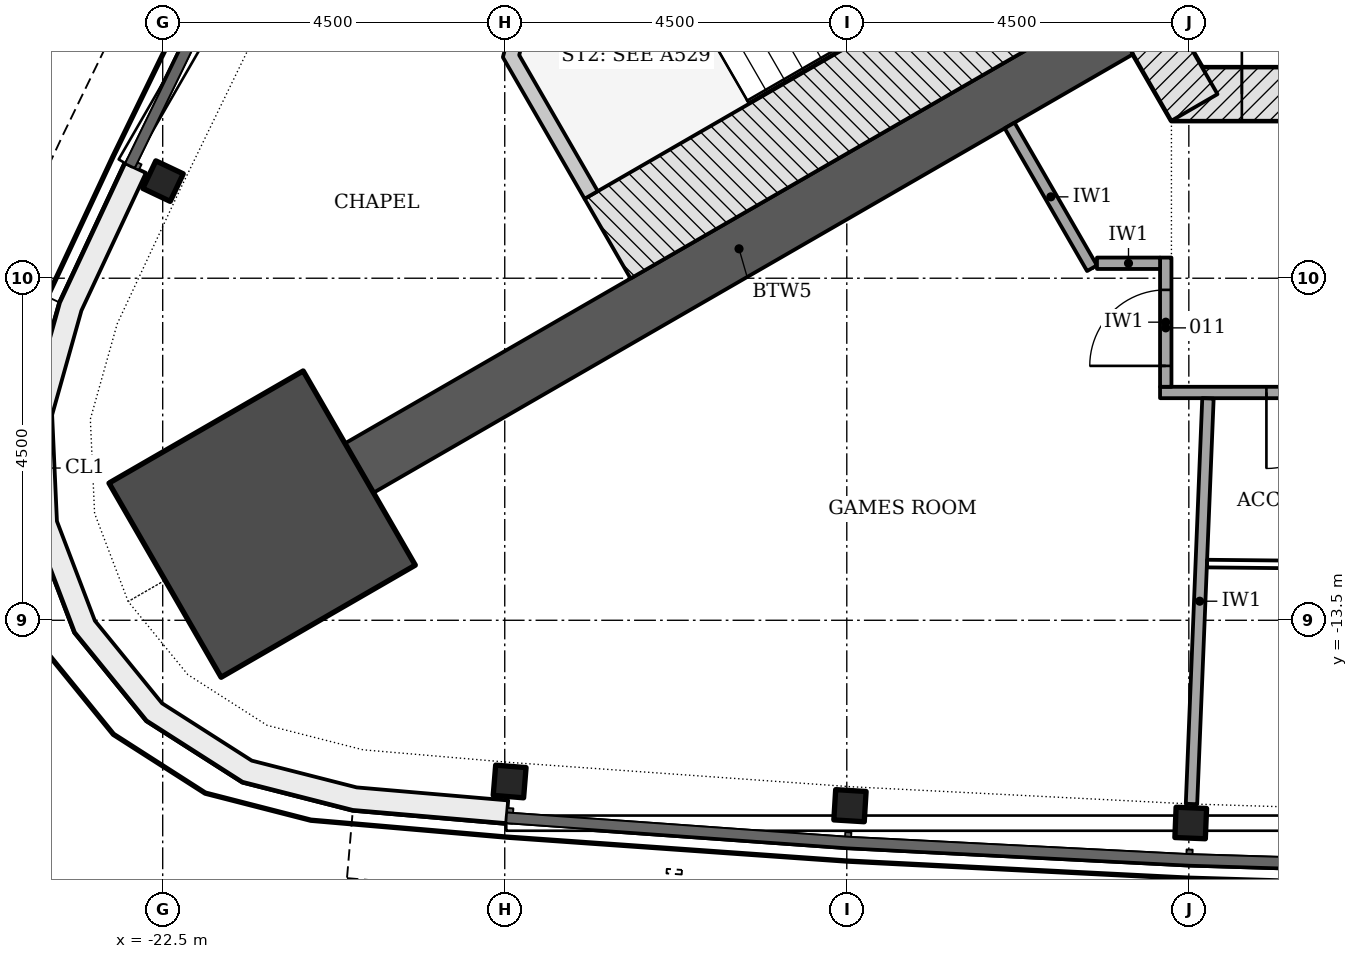
"""IFC4 building model, lengths in metres.
Left out: names, types, materials, properties, quantities, classifications, styles, units other than length and angle.
Written with IfcOpenShell. Run it as: python <this file> out.ifc"""

import sys

from ifc_helpers import new_model, si_unit, direction, frame, frame_2d, origin, origin_2d, place, context, subcontext, project, spatial, polyline, rectangle, i_section, outline, extrude, element, fill, save


model = new_model("IFC4")
c1 = context("Model", 3, precision=1e-05, world=origin(), true_north=direction((0.0, 1.0)))
c2 = subcontext(c1, "Body", "Model", "MODEL_VIEW")
j1 = project(units=[si_unit("LENGTHUNIT", "METRE"), si_unit("PLANEANGLEUNIT", "RADIAN")], contexts=[c1])
p1 = place(None, origin())
s1 = spatial("IfcSite", under=j1, at=p1, CompositionType="ELEMENT")
p2 = place(p1, origin())
s2 = spatial("IfcBuilding", under=s1, at=p2, CompositionType="ELEMENT")
p3 = place(p2, frame((0.0, 0.0, 116.7)))
s3 = spatial("IfcBuildingStorey", under=s2, at=p3, CompositionType="ELEMENT", Elevation=116.7)
p4 = place(p3, frame((-9.229, -6.578, -0.2), z_axis=(0.0, 0.0, 1.0), x_axis=(1.0, 0.0, 0.0)))
e1 = element("IfcWall", 1, at=p4, inside=s3, PredefinedType="SHEAR", context=c2, shape_type="SweptSolid", body=[
    extrude(rectangle(XDim=18.458, YDim=0.7, at=frame_2d((9.229, 0.0))), origin(), (0.0, 0.0, 1.0), 3.6),
])
p5 = place(p4, frame((3.304, 0.0, 0.2)))
e2 = element("IfcOpeningElement", 2, at=p5, cuts=e1, PredefinedType="OPENING", context=c2, shape_type="SweptSolid", body=[
    extrude(rectangle(XDim=1.1, YDim=2.1, at=frame_2d((0.55, 1.05))), frame((0.0, 0.36, 0.0), z_axis=(0.0, -1.0, 0.0), x_axis=(1.0, 0.0, 0.0)), (0.0, 0.0, 1.0), 0.72),
])
p6 = place(p4, frame((5.454, 0.0, 0.2)))
e3 = element("IfcOpeningElement", 3, at=p6, cuts=e1, PredefinedType="OPENING", context=c2, shape_type="SweptSolid", body=[
    extrude(rectangle(XDim=1.1, YDim=2.1, at=frame_2d((0.55, 1.05))), frame((0.0, 0.36, 0.0), z_axis=(0.0, -1.0, 0.0), x_axis=(1.0, 0.0, 0.0)), (0.0, 0.0, 1.0), 0.72),
])
p7 = place(p4, frame((7.604, 0.0, 0.2)))
e4 = element("IfcOpeningElement", 4, at=p7, cuts=e1, PredefinedType="OPENING", context=c2, shape_type="SweptSolid", body=[
    extrude(rectangle(XDim=1.1, YDim=2.1, at=frame_2d((0.55, 1.05))), frame((0.0, 0.36, 0.0), z_axis=(0.0, -1.0, 0.0), x_axis=(1.0, 0.0, 0.0)), (0.0, 0.0, 1.0), 0.72),
])
p8 = place(p4, frame((9.754, 0.0, 0.2)))
e5 = element("IfcOpeningElement", 5, at=p8, cuts=e1, PredefinedType="OPENING", context=c2, shape_type="SweptSolid", body=[
    extrude(rectangle(XDim=1.1, YDim=2.1, at=frame_2d((0.55, 1.05))), frame((0.0, 0.36, 0.0), z_axis=(0.0, -1.0, 0.0), x_axis=(1.0, 0.0, 0.0)), (0.0, 0.0, 1.0), 0.72),
])
p9 = place(p4, frame((11.904, 0.0, 0.2)))
e6 = element("IfcOpeningElement", 6, at=p9, cuts=e1, PredefinedType="OPENING", context=c2, shape_type="SweptSolid", body=[
    extrude(rectangle(XDim=1.1, YDim=2.1, at=frame_2d((0.55, 1.05))), frame((0.0, 0.36, 0.0), z_axis=(0.0, -1.0, 0.0), x_axis=(1.0, 0.0, 0.0)), (0.0, 0.0, 1.0), 0.72),
])
p10 = place(p4, frame((14.054, 0.0, 0.2)))
e7 = element("IfcOpeningElement", 7, at=p10, cuts=e1, PredefinedType="OPENING", context=c2, shape_type="SweptSolid", body=[
    extrude(rectangle(XDim=1.1, YDim=2.1, at=frame_2d((0.55, 1.05))), frame((0.0, 0.36, 0.0), z_axis=(0.0, -1.0, 0.0), x_axis=(1.0, 0.0, 0.0)), (0.0, 0.0, 1.0), 0.72),
])
p11 = place(p4, frame((0.926, 0.0, 0.2)))
e8 = element("IfcOpeningElement", 8, at=p11, cuts=e1, PredefinedType="OPENING", context=c2, shape_type="SweptSolid", body=[
    extrude(rectangle(XDim=0.9, YDim=2.1, at=frame_2d((0.45, 1.05))), frame((0.0, 0.36, 0.0), z_axis=(0.0, -1.0, 0.0), x_axis=(1.0, 0.0, 0.0)), (0.0, 0.0, 1.0), 0.72),
])
p12 = place(p3, frame((-10.311, -4.353, -0.2), z_axis=(0.0, 0.0, 1.0), x_axis=(0.500042739161, -0.866000726912, 0.0)))
e9 = element("IfcWall", 9, at=p12, inside=s3, PredefinedType="SHEAR", context=c2, shape_type="SweptSolid", body=[
    extrude(rectangle(XDim=2.771, YDim=0.7, at=frame_2d((1.386, 0.0))), origin(), (0.0, 0.0, 1.0), 3.6),
])
p13 = place(p3, frame((-9.922, -5.728, -0.2), z_axis=(0.0, 0.0, 1.0), x_axis=(-0.866024913782, -0.500000848707, 0.0)))
e10 = element("IfcWall", 10, at=p13, inside=s3, PredefinedType="SHEAR", context=c2, shape_type="SweptSolid", body=[
    extrude(rectangle(XDim=11.539, YDim=0.75, at=frame_2d((5.769, 0.0))), origin(), (0.0, 0.0, 1.0), 3.6),
])
p14 = place(p3, frame((-21.192, -12.235, -0.2), z_axis=(0.0, 0.0, 1.0), x_axis=(-0.866025403784, -0.5, 0.0)))
e11 = element("IfcColumn", 11, at=p14, inside=s3, PredefinedType="COLUMN", context=c2, shape_type="SweptSolid", body=[
    extrude(rectangle(XDim=2.95, YDim=2.95, at=origin_2d()), origin(), (0.0, 0.0, 1.0), 3.6),
])
for number, where, z_axis, x_axis in (
    (12, (-22.496, -7.722, -0.2), (0.0, 0.0, 1.0), (-0.428, -0.904, 0.0)),
    (13, (-17.936, -15.621, -0.2), (0.0, 0.0, 1.0), (0.997, -0.081, 0.0)),
    (14, (-13.458, -15.939, -0.2), (0.0, 0.0, 1.0), (0.998, -0.061, 0.0)),
    (15, (-8.975, -16.167, -0.2), (0.0, 0.0, 1.0), (0.999, -0.041, 0.0)),
):
    element("IfcColumn", number, at=place(p3, frame(where, z_axis=z_axis, x_axis=x_axis)), inside=s3, PredefinedType="COLUMN", context=c2, shape_type="SweptSolid", body=[
        extrude(i_section(OverallWidth=0.401, OverallDepth=0.399, WebThickness=0.025, FlangeThickness=0.04, FilletRadius=0.015, at=origin_2d()), origin(), (0.0, 0.0, 1.0), 3.6),
    ])
p15 = place(p3, origin())
e16 = element("IfcWall", 16, at=p15, inside=s3, PredefinedType="NOTDEFINED", context=c2, shape_type="SweptSolid", body=[
    extrude(outline(polyline([(-22.993, -7.487), (-23.852, -9.322), (-24.257, -10.763), (-24.189, -12.259), (-23.656, -13.658), (-22.711, -14.819), (-21.449, -15.625), (-19.999, -15.995), (-17.98, -16.169), (-17.955, -15.87), (-19.948, -15.699), (-21.328, -15.347), (-22.509, -14.592), (-23.393, -13.506), (-23.891, -12.197), (-23.955, -10.798), (-23.57, -9.426), (-22.721, -7.614), (-22.993, -7.487)])), origin(), (0.0, 0.0, 1.0), 3.3),
])
p16 = place(p3, frame((-10.412, -4.879, -0.2), z_axis=(0.0, 0.0, 1.0), x_axis=(-0.866026919366, -0.499997374926, 0.0)))
e17 = element("IfcWall", 17, at=p16, inside=s3, PredefinedType="SHEAR", context=c2, shape_type="SweptSolid", body=[
    extrude(rectangle(XDim=7.2, YDim=1.211, at=frame_2d((3.6, 0.0))), origin(), (0.0, 0.0, 1.0), 3.6),
])
p17 = place(p3, frame((0.0, 0.0, -0.2)))
e18 = element("IfcWall", 18, at=p17, inside=s3, PredefinedType="SHEAR", context=c2, shape_type="SweptSolid", body=[
    extrude(outline(polyline([(-17.439, -3.907), (-18.025, -6.093), (-16.95, -7.955), (-16.777, -7.855), (-17.81, -6.065), (-17.267, -4.039), (-17.339, -4.081), (-17.339, -4.081), (-17.339, -4.081), (-17.339, -4.081), (-17.339, -4.081), (-17.339, -4.081), (-17.339, -4.081), (-17.339, -4.081), (-17.339, -4.081), (-17.339, -4.081), (-17.339, -4.081), (-17.339, -4.081), (-17.339, -4.081), (-17.339, -4.081), (-17.339, -4.081), (-17.339, -4.081), (-17.339, -4.081), (-17.439, -3.907)])), origin(), (0.0, 0.0, 1.0), 3.6),
])
p18 = place(p3, frame((3.689, -10.503, 0.0), z_axis=(0.0, 0.0, 1.0), x_axis=(-1.0, 0.0, 0.0)))
e19 = element("IfcWall", 19, at=p18, inside=s3, PredefinedType="PARTITIONING", context=c2, shape_type="SweptSolid", body=[
    extrude(rectangle(XDim=13.068, YDim=0.15, at=frame_2d((6.534, 0.0))), origin(), (0.0, 0.0, 1.0), 2.847),
])
p19 = place(p18, frame((10.668, 0.0, 0.0)))
e20 = element("IfcOpeningElement", 20, at=p19, cuts=e19, PredefinedType="OPENING", context=c2, shape_type="SweptSolid", body=[
    extrude(rectangle(XDim=1.0, YDim=2.1, at=frame_2d((0.5, 1.05))), frame((0.0, 0.085, 0.0), z_axis=(0.0, -1.0, 0.0), x_axis=(1.0, 0.0, 0.0)), (0.0, 0.0, 1.0), 0.17),
])
p20 = place(p18, frame((8.125, 0.0, 0.0)))
e21 = element("IfcOpeningElement", 21, at=p20, cuts=e19, PredefinedType="OPENING", context=c2, shape_type="SweptSolid", body=[
    extrude(rectangle(XDim=1.0, YDim=2.1, at=frame_2d((0.5, 1.05))), frame((0.0, 0.085, 0.0), z_axis=(0.0, -1.0, 0.0), x_axis=(1.0, 0.0, 0.0)), (0.0, 0.0, 1.0), 0.17),
])
p21 = place(p18, frame((2.99, 0.0, 0.0)))
e22 = element("IfcOpeningElement", 22, at=p21, cuts=e19, PredefinedType="OPENING", context=c2, shape_type="SweptSolid", body=[
    extrude(rectangle(XDim=1.5, YDim=2.1, at=frame_2d((0.75, 1.05))), frame((0.0, 0.085, 0.0), z_axis=(0.0, -1.0, 0.0), x_axis=(1.0, 0.0, 0.0)), (0.0, 0.0, 1.0), 0.17),
])
p22 = place(p3, frame((-11.358, -6.99, 0.0), z_axis=(0.0, 0.0, 1.0), x_axis=(0.500050590816, -0.865996193193, 0.0)))
e23 = element("IfcWall", 23, at=p22, inside=s3, PredefinedType="PARTITIONING", context=c2, shape_type="SweptSolid", body=[
    extrude(rectangle(XDim=2.168, YDim=0.15, at=frame_2d((1.084, 0.0))), origin(), (0.0, 0.0, 1.0), 3.4),
])
p23 = place(p3, frame((-9.304, -10.428, 0.0), z_axis=(0.0, 0.0, 1.0), x_axis=(0.0, 1.0, 0.0)))
e24 = element("IfcWall", 24, at=p23, inside=s3, PredefinedType="PARTITIONING", context=c2, shape_type="SweptSolid", body=[
    extrude(rectangle(XDim=1.7, YDim=0.15, at=frame_2d((0.85, 0.0))), origin(), (0.0, 0.0, 1.0), 3.4),
])
p24 = place(p23, frame((0.275, 0.0, 0.0)))
e25 = element("IfcOpeningElement", 25, at=p24, cuts=e24, PredefinedType="OPENING", context=c2, shape_type="SweptSolid", body=[
    extrude(rectangle(XDim=1.0, YDim=2.1, at=frame_2d((0.5, 1.05))), frame((0.0, 0.085, 0.0), z_axis=(0.0, -1.0, 0.0), x_axis=(1.0, 0.0, 0.0)), (0.0, 0.0, 1.0), 0.17),
])
p25 = place(p3, frame((-10.209, -8.803, 0.0), z_axis=(0.0, 0.0, 1.0), x_axis=(1.0, 0.0, 0.0)))
e26 = element("IfcWall", 26, at=p25, inside=s3, PredefinedType="PARTITIONING", context=c2, shape_type="SweptSolid", body=[
    extrude(rectangle(XDim=0.83, YDim=0.15, at=frame_2d((0.415, 0.0))), origin(), (0.0, 0.0, 1.0), 3.4),
])
p26 = place(p3, frame((-8.965, -15.917, 0.0), z_axis=(0.0, 0.0, 1.0), x_axis=(0.040597936434, 0.999175563931, 0.0)))
e27 = element("IfcWall", 27, at=p26, inside=s3, PredefinedType="PARTITIONING", context=c2, shape_type="SweptSolid", body=[
    extrude(rectangle(XDim=5.34, YDim=0.15, at=frame_2d((2.67, 0.0))), origin(), (0.0, 0.0, 1.0), 2.847),
])
p27 = place(p3, frame((-8.76, -12.754, 0.0), z_axis=(0.0, 0.0, 1.0), x_axis=(0.999948543491, -0.010144474863, 0.0)))
e28 = element("IfcWall", 28, at=p27, inside=s3, PredefinedType="PARTITIONING", context=c2, shape_type="SweptSolid", body=[
    extrude(rectangle(XDim=5.102, YDim=0.1, at=frame_2d((2.551, 0.0))), origin(), (0.0, 0.0, 1.0), 2.847),
])
p28 = place(p11, origin())
e29 = element("IfcDoor", 29, at=p28, inside=s3, OperationType="SINGLE_SWING_LEFT", PredefinedType="DOOR", context=c2, shape_type="SweptSolid", body=[
    extrude(rectangle(XDim=0.9, YDim=2.1, at=frame_2d((0.45, 1.05))), frame((0.0, 0.075, 0.0), z_axis=(0.0, -1.0, 0.0), x_axis=(1.0, 0.0, 0.0)), (0.0, 0.0, 1.0), 0.15),
])
fill(e8, e29)
p29 = place(p19, origin())
e30 = element("IfcDoor", 30, at=p29, inside=s3, OperationType="SINGLE_SWING_RIGHT", PredefinedType="DOOR", context=c2, shape_type="SweptSolid", body=[
    extrude(rectangle(XDim=1.0, YDim=2.1, at=frame_2d((0.5, 1.05))), frame((0.0, 0.025, 0.0), z_axis=(0.0, -1.0, 0.0), x_axis=(1.0, 0.0, 0.0)), (0.0, 0.0, 1.0), 0.05),
])
fill(e20, e30)
p30 = place(p24, origin())
e31 = element("IfcDoor", 31, at=p30, inside=s3, OperationType="SINGLE_SWING_LEFT", PredefinedType="DOOR", context=c2, shape_type="SweptSolid", body=[
    extrude(rectangle(XDim=1.0, YDim=2.1, at=frame_2d((0.5, 1.05))), frame((0.0, 0.025, 0.0), z_axis=(0.0, -1.0, 0.0), x_axis=(1.0, 0.0, 0.0)), (0.0, 0.0, 1.0), 0.05),
])
fill(e25, e31)
save(model, sys.argv[1])
